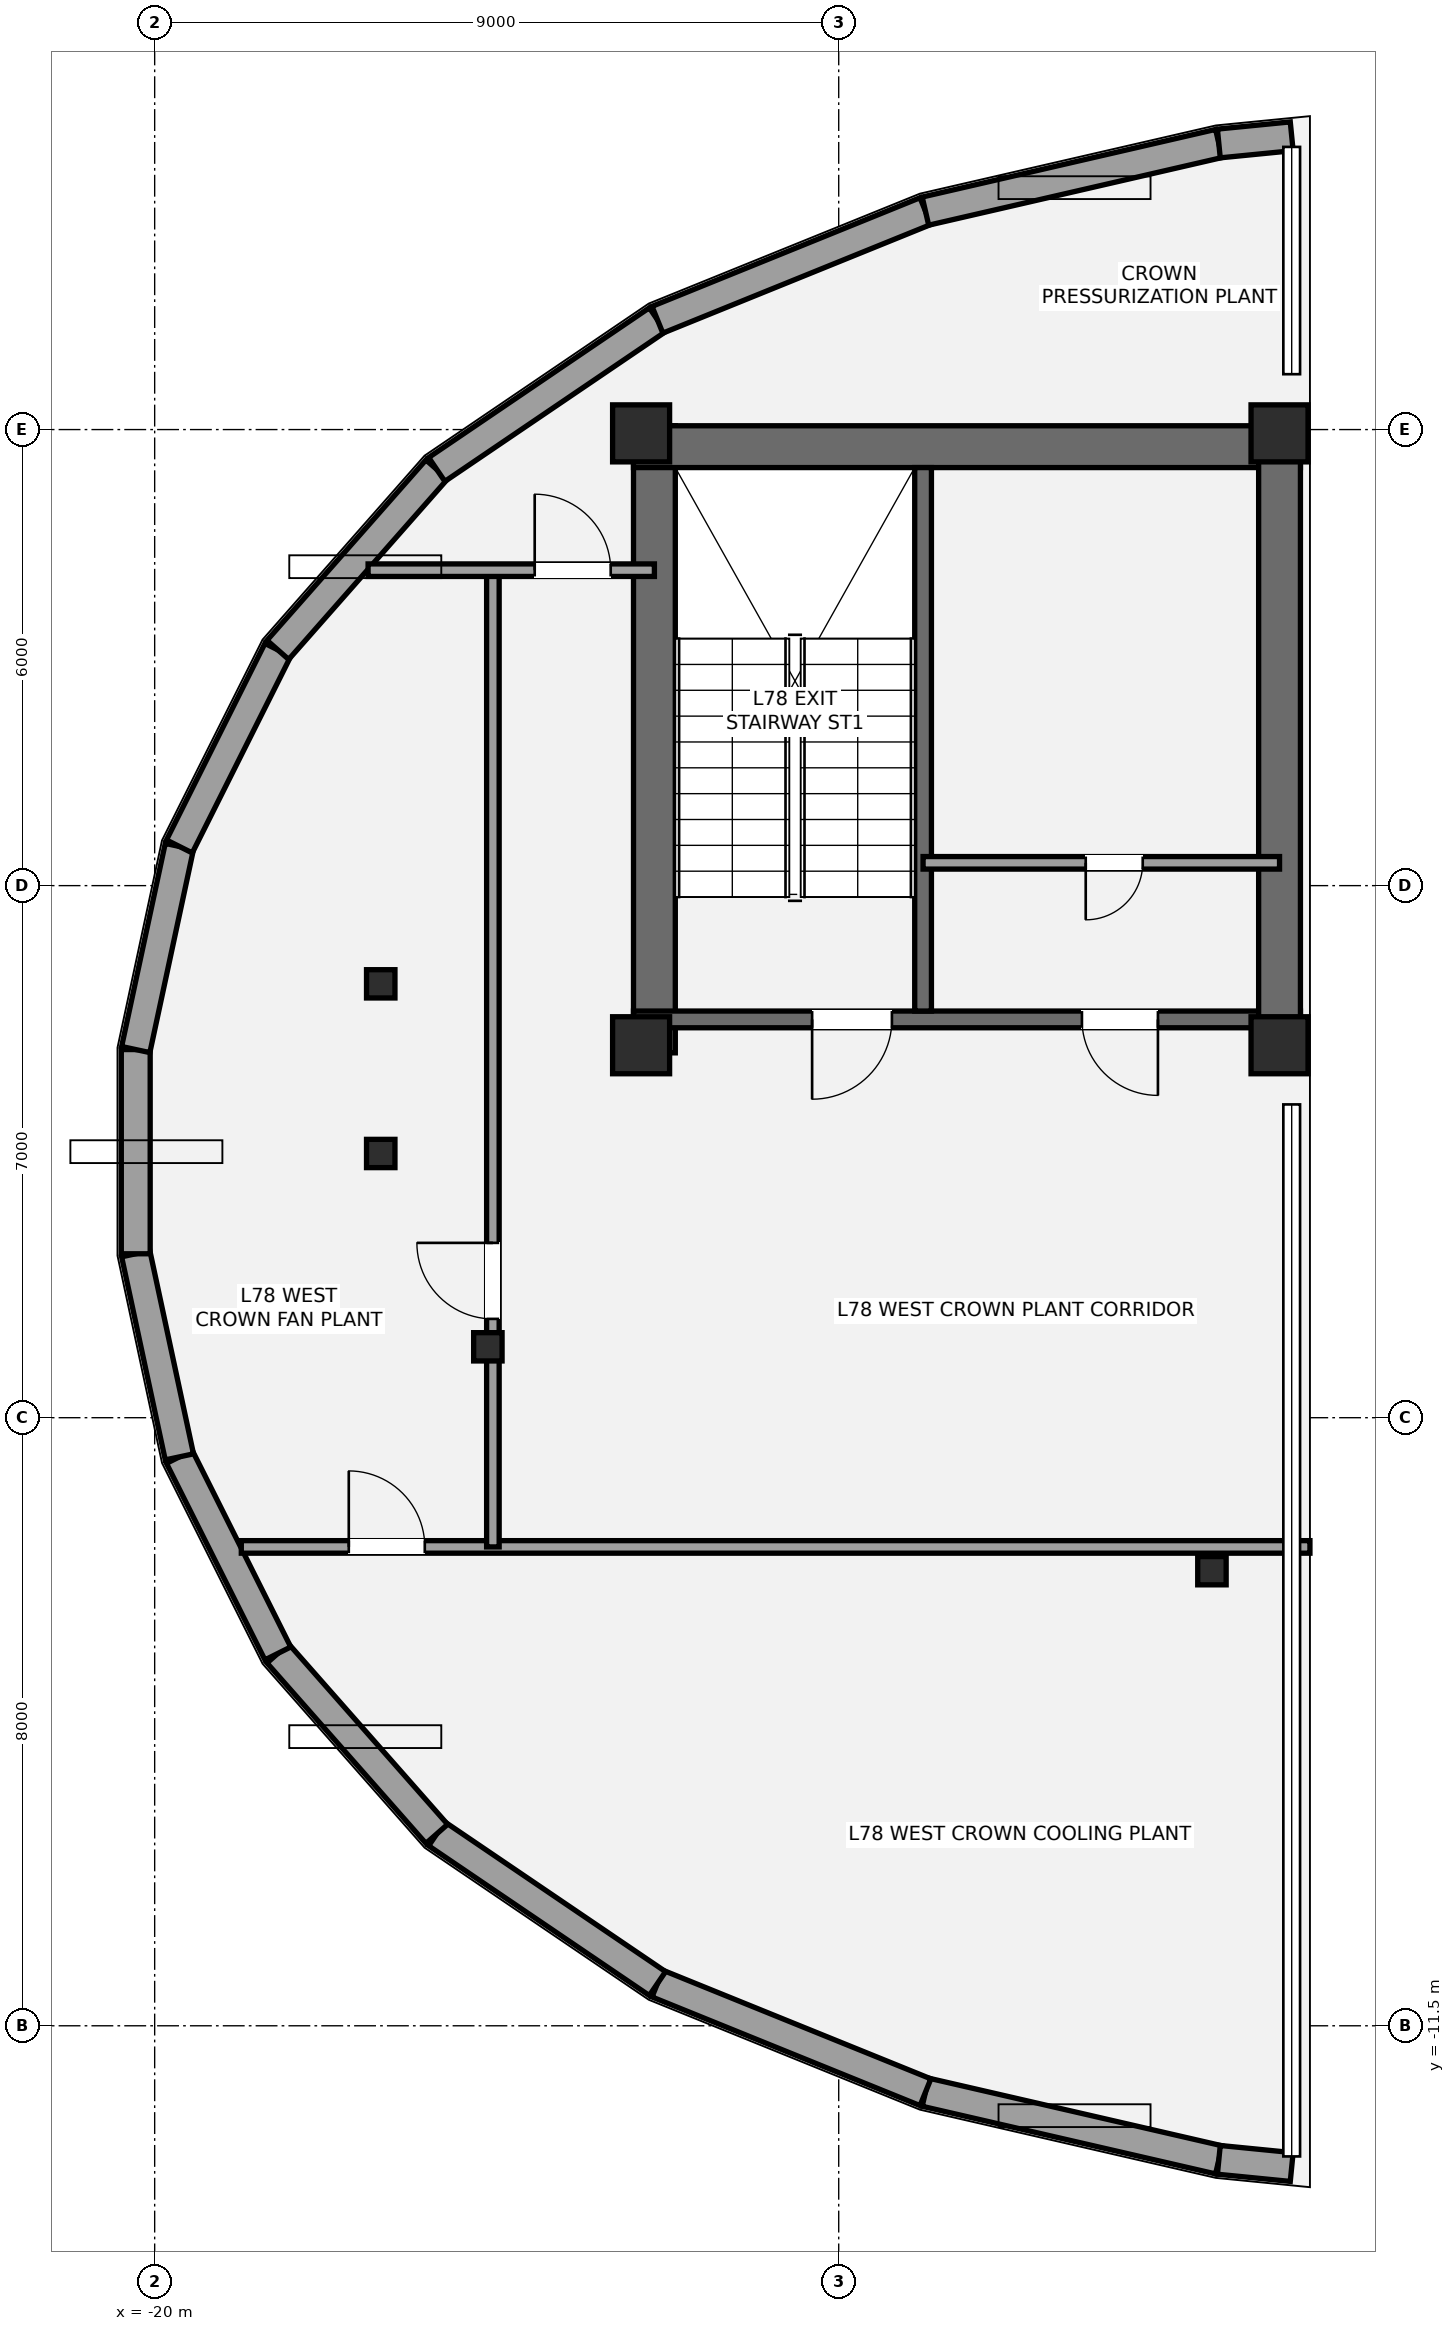
"""IFC4 building model, lengths in metres.
Left out: names, types, materials, properties, quantities, classifications, styles, units other than length and angle.
Written with IfcOpenShell. Run it as: python <this file> out.ifc"""

import sys

from ifc_helpers import new_model, si_unit, direction, frame, frame_2d, origin, origin_2d, place, context, subcontext, project, spatial, rectangle, i_section, extrude, element, fill, save


model = new_model("IFC4")
c1 = context("Model", 3, precision=1e-05, world=origin(), true_north=direction((0.0, 1.0)))
c2 = subcontext(c1, "Body", "Model", "MODEL_VIEW")
j1 = project(units=[si_unit("LENGTHUNIT", "METRE"), si_unit("PLANEANGLEUNIT", "RADIAN")], contexts=[c1])
p1 = place(None, origin())
s1 = spatial("IfcSite", under=j1, at=p1, CompositionType="ELEMENT")
p2 = place(p1, origin())
s2 = spatial("IfcBuilding", under=s1, at=p2, CompositionType="ELEMENT")
p3 = place(p2, frame((0.0, 0.0, 276.8)))
s3 = spatial("IfcBuildingStorey", under=s2, at=p3, CompositionType="ELEMENT", Elevation=276.8)
p4 = place(p3, frame((-13.425, 1.3, 0.0), z_axis=(0.0, 0.0, 1.0), x_axis=(0.0, 1.0, 0.0)))
e1 = element("IfcWall", 1, at=p4, inside=s3, PredefinedType="SHEAR", context=c2, shape_type="SweptSolid", body=[
    extrude(rectangle(XDim=8.25, YDim=0.55, at=frame_2d((4.125, 0.0))), origin(), (0.0, 0.0, 1.0), 3.8),
])
p5 = place(p3, frame((-13.7, 9.275, 0.0), z_axis=(0.0, 0.0, 1.0), x_axis=(1.0, 0.0, 0.0)))
e2 = element("IfcWall", 2, at=p5, inside=s3, PredefinedType="SHEAR", context=c2, shape_type="SweptSolid", body=[
    extrude(rectangle(XDim=8.775, YDim=0.55, at=frame_2d((4.387, 0.0))), origin(), (0.0, 0.0, 1.0), 3.8),
])
p6 = place(p3, frame((-4.925, 1.74, 0.0), z_axis=(0.0, 0.0, 1.0), x_axis=(-1.0, 0.0, 0.0)))
e3 = element("IfcWall", 3, at=p6, inside=s3, PredefinedType="SHEAR", context=c2, shape_type="SweptSolid", body=[
    extrude(rectangle(XDim=8.775, YDim=0.22, at=frame_2d((4.387, 0.0))), origin(), (0.0, 0.0, 1.0), 3.8),
])
p7 = place(p6, frame((5.375, 0.0, 0.0)))
e4 = element("IfcOpeningElement", 4, at=p7, cuts=e3, PredefinedType="OPENING", context=c2, shape_type="SweptSolid", body=[
    extrude(rectangle(XDim=1.05, YDim=2.15, at=frame_2d((0.525, 1.075))), frame((0.0, 0.12, 0.0), z_axis=(0.0, -1.0, 0.0), x_axis=(1.0, 0.0, 0.0)), (0.0, 0.0, 1.0), 0.24),
])
p8 = place(p6, frame((1.875, 0.0, 0.0)))
e5 = element("IfcOpeningElement", 5, at=p8, cuts=e3, PredefinedType="OPENING", context=c2, shape_type="SweptSolid", body=[
    extrude(rectangle(XDim=1.0, YDim=2.15, at=frame_2d((0.5, 1.075))), frame((0.0, 0.12, 0.0), z_axis=(0.0, -1.0, 0.0), x_axis=(1.0, 0.0, 0.0)), (0.0, 0.0, 1.0), 0.24),
])
p9 = place(p3, frame((-5.2, 1.3, 0.0), z_axis=(0.0, 0.0, 1.0), x_axis=(0.0, 1.0, 0.0)))
e6 = element("IfcWall", 6, at=p9, inside=s3, PredefinedType="SHEAR", context=c2, shape_type="SweptSolid", body=[
    extrude(rectangle(XDim=8.25, YDim=0.55, at=frame_2d((4.125, 0.0))), origin(), (0.0, 0.0, 1.0), 3.8),
])
p10 = place(p3, frame((-9.89, 1.85, 0.0), z_axis=(0.0, 0.0, 1.0), x_axis=(0.0, 1.0, 0.0)))
e7 = element("IfcWall", 7, at=p10, inside=s3, PredefinedType="SHEAR", context=c2, shape_type="SweptSolid", body=[
    extrude(rectangle(XDim=7.15, YDim=0.22, at=frame_2d((3.575, 0.0))), origin(), (0.0, 0.0, 1.0), 3.8),
])
for number, where, z_axis, x_axis in (
    (8, (-13.6, 1.4, 0.0), (0.0, 0.0, 1.0), (1.0, 0.0, 0.0)),
    (9, (-13.6, 9.45, 0.0), (0.0, 0.0, 1.0), (1.0, 0.0, 0.0)),
    (10, (-5.2, 1.4, 0.0), (0.0, 0.0, 1.0), (1.0, 0.0, 0.0)),
    (11, (-5.2, 9.45, 0.0), (0.0, 0.0, 1.0), (1.0, 0.0, 0.0)),
):
    element("IfcColumn", number, at=place(p3, frame(where, z_axis=z_axis, x_axis=x_axis)), inside=s3, PredefinedType="PILASTER", context=c2, shape_type="SweptSolid", body=[
        extrude(rectangle(XDim=0.75, YDim=0.75, at=origin_2d()), origin(), (0.0, 0.0, 1.0), 3.8),
    ])
for number, where, z_axis, x_axis in (
    (12, (-17.026, 2.208, 0.0), (0.0, 0.0, 1.0), (1.0, 0.0, 0.0)),
    (13, (-17.026, -0.024, 0.0), (0.0, 0.0, 1.0), (1.0, 0.0, 0.0)),
    (14, (-15.616, -2.567, 0.0), (0.0, 0.0, 1.0), (1.0, 0.0, 0.0)),
    (15, (-6.09, -5.513, 0.0), (0.0, 0.0, 1.0), (1.0, 0.0, 0.0)),
):
    element("IfcColumn", number, at=place(p3, frame(where, z_axis=z_axis, x_axis=x_axis)), inside=s3, PredefinedType="COLUMN", context=c2, shape_type="SweptSolid", body=[
        extrude(i_section(OverallWidth=0.374, OverallDepth=0.372, WebThickness=0.016, FlangeThickness=0.026, at=origin_2d()), origin(), (0.0, 0.0, 1.0), 3.8),
    ])
p11 = place(p3, frame((-9.859, -12.374, 0.0), z_axis=(0.0, 0.0, 1.0), x_axis=(0.974441030185, -0.224643447918, 0.0)))
e16 = element("IfcWall", 16, at=p11, inside=s3, PredefinedType="ELEMENTEDWALL", context=c2, shape_type="SweptSolid", body=[
    extrude(rectangle(XDim=3.961, YDim=0.38, at=frame_2d((1.981, 0.0))), origin(), (0.0, 0.0, 1.0), 2.97),
])
p12 = place(p3, frame((-13.385, -10.945, 0.0), z_axis=(0.0, 0.0, 1.0), x_axis=(0.926776699004, -0.375612766268, 0.0)))
e17 = element("IfcWall", 17, at=p12, inside=s3, PredefinedType="ELEMENTEDWALL", context=c2, shape_type="SweptSolid", body=[
    extrude(rectangle(XDim=3.805, YDim=0.38, at=frame_2d((1.902, 0.0))), origin(), (0.0, 0.0, 1.0), 2.97),
])
p13 = place(p3, frame((-16.289, -8.975, 0.0), z_axis=(0.0, 0.0, 1.0), x_axis=(0.827558908117, -0.561378885955, 0.0)))
e18 = element("IfcWall", 18, at=p13, inside=s3, PredefinedType="ELEMENTEDWALL", context=c2, shape_type="SweptSolid", body=[
    extrude(rectangle(XDim=3.508, YDim=0.38, at=frame_2d((1.754, 0.0))), origin(), (0.0, 0.0, 1.0), 2.97),
])
p14 = place(p3, frame((-18.379, -6.602, 0.0), z_axis=(0.0, 0.0, 1.0), x_axis=(0.660965358004, -0.750416414745, 0.0)))
e19 = element("IfcWall", 19, at=p14, inside=s3, PredefinedType="ELEMENTEDWALL", context=c2, shape_type="SweptSolid", body=[
    extrude(rectangle(XDim=3.163, YDim=0.38, at=frame_2d((1.582, 0.0))), origin(), (0.0, 0.0, 1.0), 2.97),
])
p15 = place(p3, frame((-19.675, -4.015, 0.0), z_axis=(0.0, 0.0, 1.0), x_axis=(0.447922433418, -0.894072420803, 0.0)))
e20 = element("IfcWall", 20, at=p15, inside=s3, PredefinedType="ELEMENTEDWALL", context=c2, shape_type="SweptSolid", body=[
    extrude(rectangle(XDim=2.893, YDim=0.38, at=frame_2d((1.446, 0.0))), origin(), (0.0, 0.0, 1.0), 2.97),
])
p16 = place(p3, frame((-20.249, -1.344, 0.0), z_axis=(0.0, 0.0, 1.0), x_axis=(0.210029343878, -0.977695082687, 0.0)))
e21 = element("IfcWall", 21, at=p16, inside=s3, PredefinedType="ELEMENTEDWALL", context=c2, shape_type="SweptSolid", body=[
    extrude(rectangle(XDim=2.733, YDim=0.38, at=frame_2d((1.366, 0.0))), origin(), (0.0, 0.0, 1.0), 2.97),
])
p17 = place(p3, frame((-20.249, 1.344, 0.0), z_axis=(0.0, 0.0, 1.0), x_axis=(0.0, -1.0, 0.0)))
e22 = element("IfcWall", 22, at=p17, inside=s3, PredefinedType="ELEMENTEDWALL", context=c2, shape_type="SweptSolid", body=[
    extrude(rectangle(XDim=2.687, YDim=0.38, at=frame_2d((1.344, 0.0))), origin(), (0.0, 0.0, 1.0), 2.97),
])
p18 = place(p3, frame((-19.675, 4.015, 0.0), z_axis=(0.0, 0.0, 1.0), x_axis=(-0.210029343878, -0.977695082687, 0.0)))
e23 = element("IfcWall", 23, at=p18, inside=s3, PredefinedType="ELEMENTEDWALL", context=c2, shape_type="SweptSolid", body=[
    extrude(rectangle(XDim=2.733, YDim=0.38, at=frame_2d((1.366, 0.0))), origin(), (0.0, 0.0, 1.0), 2.97),
])
p19 = place(p3, frame((-18.379, 6.602, 0.0), z_axis=(0.0, 0.0, 1.0), x_axis=(-0.447922433418, -0.894072420803, 0.0)))
e24 = element("IfcWall", 24, at=p19, inside=s3, PredefinedType="ELEMENTEDWALL", context=c2, shape_type="SweptSolid", body=[
    extrude(rectangle(XDim=2.893, YDim=0.38, at=frame_2d((1.446, 0.0))), origin(), (0.0, 0.0, 1.0), 2.97),
])
p20 = place(p3, frame((-16.289, 8.975, 0.0), z_axis=(0.0, 0.0, 1.0), x_axis=(-0.660965358004, -0.750416414745, 0.0)))
e25 = element("IfcWall", 25, at=p20, inside=s3, PredefinedType="ELEMENTEDWALL", context=c2, shape_type="SweptSolid", body=[
    extrude(rectangle(XDim=3.163, YDim=0.38, at=frame_2d((1.582, 0.0))), origin(), (0.0, 0.0, 1.0), 2.97),
])
p21 = place(p3, frame((-13.385, 10.945, 0.0), z_axis=(0.0, 0.0, 1.0), x_axis=(-0.827558908117, -0.561378885955, 0.0)))
e26 = element("IfcWall", 26, at=p21, inside=s3, PredefinedType="ELEMENTEDWALL", context=c2, shape_type="SweptSolid", body=[
    extrude(rectangle(XDim=3.508, YDim=0.38, at=frame_2d((1.754, 0.0))), origin(), (0.0, 0.0, 1.0), 2.97),
])
p22 = place(p3, frame((-9.859, 12.374, 0.0), z_axis=(0.0, 0.0, 1.0), x_axis=(-0.926776699004, -0.375612766268, 0.0)))
e27 = element("IfcWall", 27, at=p22, inside=s3, PredefinedType="ELEMENTEDWALL", context=c2, shape_type="SweptSolid", body=[
    extrude(rectangle(XDim=3.805, YDim=0.38, at=frame_2d((1.902, 0.0))), origin(), (0.0, 0.0, 1.0), 2.97),
])
p23 = place(p3, frame((-5.999, 13.264, 0.0), z_axis=(0.0, 0.0, 1.0), x_axis=(-0.974441030185, -0.224643447918, 0.0)))
e28 = element("IfcWall", 28, at=p23, inside=s3, PredefinedType="ELEMENTEDWALL", context=c2, shape_type="SweptSolid", body=[
    extrude(rectangle(XDim=3.961, YDim=0.38, at=frame_2d((1.981, 0.0))), origin(), (0.0, 0.0, 1.0), 2.97),
])
for number, where, z_axis, x_axis in (
    (29, (-5.04, 13.359, 0.0), (0.0, 0.0, 1.0), (-0.995, -0.098, 0.0)),
    (30, (-5.999, -13.264, 0.0), (0.0, 0.0, 1.0), (0.995, -0.098, 0.0)),
):
    element("IfcWall", number, at=place(p3, frame(where, z_axis=z_axis, x_axis=x_axis)), inside=s3, PredefinedType="ELEMENTEDWALL", context=c2, shape_type="SweptSolid", body=[
        extrude(rectangle(XDim=0.963, YDim=0.38, at=frame_2d((0.482, 0.0))), origin(), (0.0, 0.0, 1.0), 2.97),
    ])
p24 = place(p3, frame((-5.2, 3.8, 0.0), z_axis=(0.0, 0.0, 1.0), x_axis=(-1.0, 0.0, 0.0)))
e31 = element("IfcWall", 31, at=p24, inside=s3, PredefinedType="PARTITIONING", context=c2, shape_type="SweptSolid", body=[
    extrude(rectangle(XDim=4.69, YDim=0.165, at=frame_2d((2.345, 0.0))), origin(), (0.0, 0.0, 1.0), 3.6),
])
p25 = place(p24, frame((1.8, 0.0, 0.0)))
e32 = element("IfcOpeningElement", 32, at=p25, cuts=e31, PredefinedType="OPENING", context=c2, shape_type="SweptSolid", body=[
    extrude(rectangle(XDim=0.75, YDim=2.1, at=frame_2d((0.375, 1.05))), frame((0.0, 0.093, 0.0), z_axis=(0.0, -1.0, 0.0), x_axis=(1.0, 0.0, 0.0)), (0.0, 0.0, 1.0), 0.185),
])
p26 = place(p3, frame((-18.86, -5.2, 0.0), z_axis=(0.0, 0.0, 1.0), x_axis=(1.0, 0.0, 0.0)))
e33 = element("IfcWall", 33, at=p26, inside=s3, PredefinedType="PARTITIONING", context=c2, shape_type="SweptSolid", body=[
    extrude(rectangle(XDim=14.06, YDim=0.165, at=frame_2d((7.03, 0.0))), origin(), (0.0, 0.0, 1.0), 2.987),
])
p27 = place(p26, frame((1.414, 0.0, 0.0)))
e34 = element("IfcOpeningElement", 34, at=p27, cuts=e33, PredefinedType="OPENING", context=c2, shape_type="SweptSolid", body=[
    extrude(rectangle(XDim=1.0, YDim=2.15, at=frame_2d((0.5, 1.075))), frame((0.0, 0.093, 0.0), z_axis=(0.0, -1.0, 0.0), x_axis=(1.0, 0.0, 0.0)), (0.0, 0.0, 1.0), 0.185),
])
p28 = place(p3, frame((-15.55, -5.2, 0.0), z_axis=(0.0, 0.0, 1.0), x_axis=(0.0, 1.0, 0.0)))
e35 = element("IfcWall", 35, at=p28, inside=s3, PredefinedType="PARTITIONING", context=c2, shape_type="SweptSolid", body=[
    extrude(rectangle(XDim=12.85, YDim=0.165, at=frame_2d((6.425, 0.0))), origin(), (0.0, 0.0, 1.0), 2.987),
])
p29 = place(p28, frame((3.0, 0.0, 0.0)))
e36 = element("IfcOpeningElement", 36, at=p29, cuts=e35, PredefinedType="OPENING", context=c2, shape_type="SweptSolid", body=[
    extrude(rectangle(XDim=1.0, YDim=2.15, at=frame_2d((0.5, 1.075))), frame((0.0, 0.093, 0.0), z_axis=(0.0, -1.0, 0.0), x_axis=(1.0, 0.0, 0.0)), (0.0, 0.0, 1.0), 0.185),
])
p30 = place(p3, frame((-17.192, 7.65, 0.0), z_axis=(0.0, 0.0, 1.0), x_axis=(1.0, 0.0, 0.0)))
e37 = element("IfcWall", 37, at=p30, inside=s3, PredefinedType="PARTITIONING", context=c2, shape_type="SweptSolid", body=[
    extrude(rectangle(XDim=3.767, YDim=0.165, at=frame_2d((1.883, 0.0))), origin(), (0.0, 0.0, 1.0), 2.968),
])
p31 = place(p30, frame((2.192, 0.0, 0.0)))
e38 = element("IfcOpeningElement", 38, at=p31, cuts=e37, PredefinedType="OPENING", context=c2, shape_type="SweptSolid", body=[
    extrude(rectangle(XDim=1.0, YDim=2.15, at=frame_2d((0.5, 1.075))), frame((0.0, 0.093, 0.0), z_axis=(0.0, -1.0, 0.0), x_axis=(1.0, 0.0, 0.0)), (0.0, 0.0, 1.0), 0.185),
])
p32 = place(p7, origin())
e39 = element("IfcDoor", 39, at=p32, inside=s3, OperationType="SINGLE_SWING_RIGHT", PredefinedType="DOOR", context=c2, shape_type="SweptSolid", body=[
    extrude(rectangle(XDim=1.05, YDim=2.15, at=frame_2d((0.525, 1.075))), frame((0.0, 0.025, 0.0), z_axis=(0.0, -1.0, 0.0), x_axis=(1.0, 0.0, 0.0)), (0.0, 0.0, 1.0), 0.05),
])
fill(e4, e39)
p33 = place(p8, origin())
e40 = element("IfcDoor", 40, at=p33, inside=s3, OperationType="SINGLE_SWING_LEFT", PredefinedType="DOOR", context=c2, shape_type="SweptSolid", body=[
    extrude(rectangle(XDim=1.0, YDim=2.15, at=frame_2d((0.5, 1.075))), frame((0.0, 0.025, 0.0), z_axis=(0.0, -1.0, 0.0), x_axis=(1.0, 0.0, 0.0)), (0.0, 0.0, 1.0), 0.05),
])
fill(e5, e40)
p34 = place(p25, origin())
e41 = element("IfcDoor", 41, at=p34, inside=s3, OperationType="SINGLE_SWING_RIGHT", PredefinedType="DOOR", context=c2, shape_type="SweptSolid", body=[
    extrude(rectangle(XDim=0.75, YDim=2.1, at=frame_2d((0.375, 1.05))), frame((0.0, 0.025, 0.0), z_axis=(0.0, -1.0, 0.0), x_axis=(1.0, 0.0, 0.0)), (0.0, 0.0, 1.0), 0.05),
])
fill(e32, e41)
p35 = place(p27, origin())
e42 = element("IfcDoor", 42, at=p35, inside=s3, OperationType="SINGLE_SWING_LEFT", PredefinedType="DOOR", context=c2, shape_type="SweptSolid", body=[
    extrude(rectangle(XDim=1.0, YDim=2.15, at=frame_2d((0.5, 1.075))), frame((0.0, 0.025, 0.0), z_axis=(0.0, -1.0, 0.0), x_axis=(1.0, 0.0, 0.0)), (0.0, 0.0, 1.0), 0.05),
])
fill(e34, e42)
p36 = place(p29, origin())
e43 = element("IfcDoor", 43, at=p36, inside=s3, OperationType="SINGLE_SWING_RIGHT", PredefinedType="DOOR", context=c2, shape_type="SweptSolid", body=[
    extrude(rectangle(XDim=1.0, YDim=2.15, at=frame_2d((0.5, 1.075))), frame((0.0, 0.025, 0.0), z_axis=(0.0, -1.0, 0.0), x_axis=(1.0, 0.0, 0.0)), (0.0, 0.0, 1.0), 0.05),
])
fill(e36, e43)
p37 = place(p31, origin())
e44 = element("IfcDoor", 44, at=p37, inside=s3, OperationType="SINGLE_SWING_LEFT", PredefinedType="DOOR", context=c2, shape_type="SweptSolid", body=[
    extrude(rectangle(XDim=1.0, YDim=2.15, at=frame_2d((0.5, 1.075))), frame((0.0, 0.025, 0.0), z_axis=(0.0, -1.0, 0.0), x_axis=(1.0, 0.0, 0.0)), (0.0, 0.0, 1.0), 0.05),
])
fill(e38, e44)
save(model, sys.argv[1])
